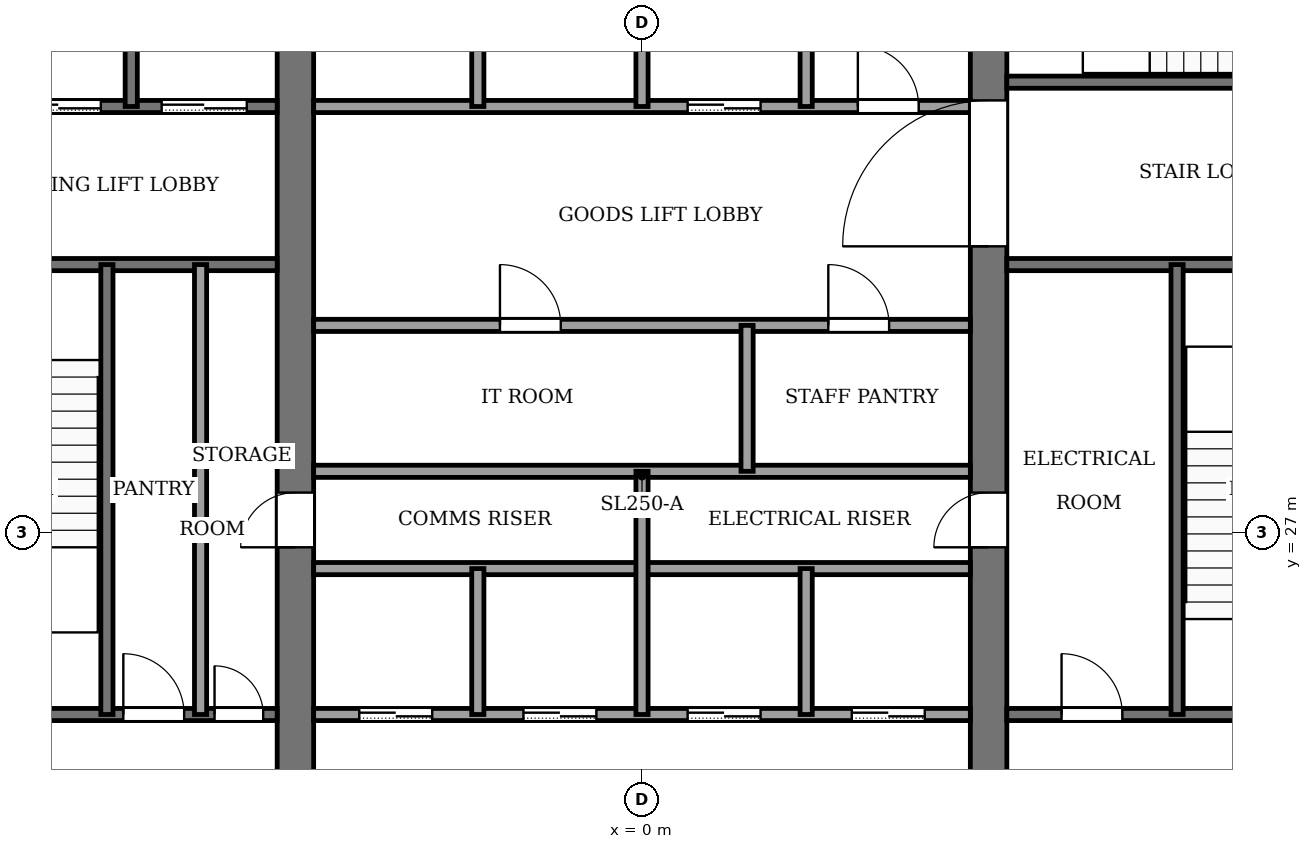
"""IFC4 building model, lengths in metres.
Left out: names, types, materials, properties, quantities, classifications, styles, units other than length and angle.
Written with IfcOpenShell. Run it as: python <this file> out.ifc"""

import sys

from ifc_helpers import new_model, si_unit, direction, frame, frame_2d, origin, place, context, subcontext, project, spatial, rectangle, extrude, element, fill, save


model = new_model("IFC4")
c1 = context("Model", 3, precision=1e-05, world=origin(), true_north=direction((0.0, 1.0)))
c2 = subcontext(c1, "Body", "Model", "MODEL_VIEW")
j1 = project(units=[si_unit("LENGTHUNIT", "METRE"), si_unit("PLANEANGLEUNIT", "RADIAN")], contexts=[c1])
p1 = place(None, origin())
s1 = spatial("IfcSite", under=j1, at=p1, CompositionType="ELEMENT")
p2 = place(p1, origin())
s2 = spatial("IfcBuilding", under=s1, at=p2, CompositionType="ELEMENT")
p3 = place(p2, frame((0.0, 0.0, 262.0)))
s3 = spatial("IfcBuildingStorey", under=s2, at=p3, CompositionType="ELEMENT", Elevation=262.0)
p4 = place(p3, frame((-5.7, 18.4, -0.13), z_axis=(0.0, 0.0, 1.0), x_axis=(0.0, 1.0, 0.0)))
e1 = element("IfcWall", 1, at=p4, inside=s3, PredefinedType="SHEAR", context=c2, shape_type="SweptSolid", body=[
    extrude(rectangle(XDim=19.2, YDim=0.6, at=frame_2d((9.6, 0.0))), origin(), (0.0, 0.0, 1.0), 4.0),
])
p5 = place(p4, frame((8.35, 0.0, 0.13)))
e2 = element("IfcOpeningElement", 2, at=p5, cuts=e1, PredefinedType="OPENING", context=c2, shape_type="SweptSolid", body=[
    extrude(rectangle(XDim=0.9, YDim=2.1, at=frame_2d((0.45, 1.05))), frame((0.0, 0.31, 0.0), z_axis=(0.0, -1.0, 0.0), x_axis=(1.0, 0.0, 0.0)), (0.0, 0.0, 1.0), 0.62),
])
p6 = place(p3, frame((5.7, 18.4, -0.13), z_axis=(0.0, 0.0, 1.0), x_axis=(0.0, 1.0, 0.0)))
e3 = element("IfcWall", 3, at=p6, inside=s3, PredefinedType="SHEAR", context=c2, shape_type="SweptSolid", body=[
    extrude(rectangle(XDim=19.2, YDim=0.6, at=frame_2d((9.6, 0.0))), origin(), (0.0, 0.0, 1.0), 4.0),
])
p7 = place(p6, frame((8.35, 0.0, 0.13)))
e4 = element("IfcOpeningElement", 4, at=p7, cuts=e3, PredefinedType="OPENING", context=c2, shape_type="SweptSolid", body=[
    extrude(rectangle(XDim=0.9, YDim=2.1, at=frame_2d((0.45, 1.05))), frame((0.0, 0.31, 0.0), z_axis=(0.0, -1.0, 0.0), x_axis=(1.0, 0.0, 0.0)), (0.0, 0.0, 1.0), 0.62),
])
p8 = place(p6, frame((13.3, 0.0, 0.13)))
e5 = element("IfcOpeningElement", 5, at=p8, cuts=e3, PredefinedType="OPENING", context=c2, shape_type="SweptSolid", body=[
    extrude(rectangle(XDim=2.4, YDim=2.4, at=frame_2d((1.2, 1.2))), frame((0.0, 0.31, 0.0), z_axis=(0.0, -1.0, 0.0), x_axis=(1.0, 0.0, 0.0)), (0.0, 0.0, 1.0), 0.62),
])
p9 = place(p3, frame((-12.6, 24.0, 0.0), z_axis=(0.0, 0.0, 1.0), x_axis=(1.0, 0.0, 0.0)))
e6 = element("IfcWall", 6, at=p9, inside=s3, PredefinedType="PARTITIONING", context=c2, shape_type="SweptSolid", body=[
    extrude(rectangle(XDim=6.6, YDim=0.2, at=frame_2d((3.3, 0.0))), origin(), (0.0, 0.0, 1.0), 3.87),
])
p10 = place(p9, frame((4.07, 0.0, 0.0)))
e7 = element("IfcOpeningElement", 7, at=p10, cuts=e6, PredefinedType="OPENING", context=c2, shape_type="SweptSolid", body=[
    extrude(rectangle(XDim=1.0, YDim=2.1, at=frame_2d((0.5, 1.05))), frame((0.0, 0.11, 0.0), z_axis=(0.0, -1.0, 0.0), x_axis=(1.0, 0.0, 0.0)), (0.0, 0.0, 1.0), 0.22),
])
p11 = place(p9, frame((5.57, 0.0, 0.0)))
e8 = element("IfcOpeningElement", 8, at=p11, cuts=e6, PredefinedType="OPENING", context=c2, shape_type="SweptSolid", body=[
    extrude(rectangle(XDim=0.8, YDim=2.1, at=frame_2d((0.4, 1.05))), frame((0.0, 0.11, 0.0), z_axis=(0.0, -1.0, 0.0), x_axis=(1.0, 0.0, 0.0)), (0.0, 0.0, 1.0), 0.22),
])
p12 = place(p3, frame((-5.4, 24.0, 0.0), z_axis=(0.0, 0.0, 1.0), x_axis=(1.0, 0.0, 0.0)))
e9 = element("IfcWall", 9, at=p12, inside=s3, PredefinedType="PARTITIONING", context=c2, shape_type="SweptSolid", body=[
    extrude(rectangle(XDim=10.8, YDim=0.2, at=frame_2d((5.4, 0.0))), origin(), (0.0, 0.0, 1.0), 3.87),
])
p13 = place(p12, frame((0.75, 0.0, 0.0)))
e10 = element("IfcOpeningElement", 10, at=p13, cuts=e9, PredefinedType="OPENING", context=c2, shape_type="SweptSolid", body=[
    extrude(rectangle(XDim=1.2, YDim=2.2, at=frame_2d((0.6, 1.1))), frame((0.0, 0.11, 0.0), z_axis=(0.0, -1.0, 0.0), x_axis=(1.0, 0.0, 0.0)), (0.0, 0.0, 1.0), 0.22),
])
p14 = place(p12, frame((3.45, 0.0, 0.0)))
e11 = element("IfcOpeningElement", 11, at=p14, cuts=e9, PredefinedType="OPENING", context=c2, shape_type="SweptSolid", body=[
    extrude(rectangle(XDim=1.2, YDim=2.2, at=frame_2d((0.6, 1.1))), frame((0.0, 0.11, 0.0), z_axis=(0.0, -1.0, 0.0), x_axis=(1.0, 0.0, 0.0)), (0.0, 0.0, 1.0), 0.22),
])
p15 = place(p12, frame((6.15, 0.0, 0.0)))
e12 = element("IfcOpeningElement", 12, at=p15, cuts=e9, PredefinedType="OPENING", context=c2, shape_type="SweptSolid", body=[
    extrude(rectangle(XDim=1.2, YDim=2.2, at=frame_2d((0.6, 1.1))), frame((0.0, 0.11, 0.0), z_axis=(0.0, -1.0, 0.0), x_axis=(1.0, 0.0, 0.0)), (0.0, 0.0, 1.0), 0.22),
])
p16 = place(p12, frame((8.85, 0.0, 0.0)))
e13 = element("IfcOpeningElement", 13, at=p16, cuts=e9, PredefinedType="OPENING", context=c2, shape_type="SweptSolid", body=[
    extrude(rectangle(XDim=1.2, YDim=2.2, at=frame_2d((0.6, 1.1))), frame((0.0, 0.11, 0.0), z_axis=(0.0, -1.0, 0.0), x_axis=(1.0, 0.0, 0.0)), (0.0, 0.0, 1.0), 0.22),
])
p17 = place(p3, frame((6.0, 24.0, 0.0), z_axis=(0.0, 0.0, 1.0), x_axis=(1.0, 0.0, 0.0)))
e14 = element("IfcWall", 14, at=p17, inside=s3, PredefinedType="PARTITIONING", context=c2, shape_type="SweptSolid", body=[
    extrude(rectangle(XDim=6.6, YDim=0.2, at=frame_2d((3.3, 0.0))), origin(), (0.0, 0.0, 1.0), 3.87),
])
p18 = place(p17, frame((0.9, 0.0, 0.0)))
e15 = element("IfcOpeningElement", 15, at=p18, cuts=e14, PredefinedType="OPENING", context=c2, shape_type="SweptSolid", body=[
    extrude(rectangle(XDim=1.0, YDim=2.1, at=frame_2d((0.5, 1.05))), frame((0.0, 0.11, 0.0), z_axis=(0.0, -1.0, 0.0), x_axis=(1.0, 0.0, 0.0)), (0.0, 0.0, 1.0), 0.22),
])
p19 = place(p17, frame((4.4, 0.0, 0.0)))
e16 = element("IfcOpeningElement", 16, at=p19, cuts=e14, PredefinedType="OPENING", context=c2, shape_type="SweptSolid", body=[
    extrude(rectangle(XDim=1.2, YDim=2.2, at=frame_2d((0.6, 1.1))), frame((0.0, 0.11, 0.0), z_axis=(0.0, -1.0, 0.0), x_axis=(1.0, 0.0, 0.0)), (0.0, 0.0, 1.0), 0.22),
])
for number, where, z_axis, x_axis in (
    (17, (-5.4, 26.4, 0.0), (0.0, 0.0, 1.0), (1.0, 0.0, 0.0)),
    (18, (-5.4, 28.0, 0.0), (0.0, 0.0, 1.0), (1.0, 0.0, 0.0)),
):
    element("IfcWall", number, at=place(p3, frame(where, z_axis=z_axis, x_axis=x_axis)), inside=s3, PredefinedType="PARTITIONING", context=c2, shape_type="SweptSolid", body=[
        extrude(rectangle(XDim=10.8, YDim=0.2, at=frame_2d((5.4, 0.0))), origin(), (0.0, 0.0, 1.0), 3.87),
    ])
p20 = place(p3, frame((-5.4, 30.4, 0.0), z_axis=(0.0, 0.0, 1.0), x_axis=(1.0, 0.0, 0.0)))
e19 = element("IfcWall", 19, at=p20, inside=s3, PredefinedType="PARTITIONING", context=c2, shape_type="SweptSolid", body=[
    extrude(rectangle(XDim=10.8, YDim=0.2, at=frame_2d((5.4, 0.0))), origin(), (0.0, 0.0, 1.0), 3.87),
])
p21 = place(p20, frame((3.064, 0.0, 0.0)))
e20 = element("IfcOpeningElement", 20, at=p21, cuts=e19, PredefinedType="OPENING", context=c2, shape_type="SweptSolid", body=[
    extrude(rectangle(XDim=1.0, YDim=2.1, at=frame_2d((0.5, 1.05))), frame((0.0, 0.11, 0.0), z_axis=(0.0, -1.0, 0.0), x_axis=(1.0, 0.0, 0.0)), (0.0, 0.0, 1.0), 0.22),
])
p22 = place(p20, frame((8.464, 0.0, 0.0)))
e21 = element("IfcOpeningElement", 21, at=p22, cuts=e19, PredefinedType="OPENING", context=c2, shape_type="SweptSolid", body=[
    extrude(rectangle(XDim=1.0, YDim=2.1, at=frame_2d((0.5, 1.05))), frame((0.0, 0.11, 0.0), z_axis=(0.0, -1.0, 0.0), x_axis=(1.0, 0.0, 0.0)), (0.0, 0.0, 1.0), 0.22),
])
p23 = place(p3, frame((-12.6, 31.4, 0.0), z_axis=(0.0, 0.0, 1.0), x_axis=(1.0, 0.0, 0.0)))
e22 = element("IfcWall", 22, at=p23, inside=s3, PredefinedType="PARTITIONING", context=c2, shape_type="SweptSolid", body=[
    extrude(rectangle(XDim=6.6, YDim=0.2, at=frame_2d((3.3, 0.0))), origin(), (0.0, 0.0, 1.0), 3.87),
])
p24 = place(p23, frame((1.0, 0.0, 0.0)))
e23 = element("IfcOpeningElement", 23, at=p24, cuts=e22, PredefinedType="OPENING", context=c2, shape_type="SweptSolid", body=[
    extrude(rectangle(XDim=1.2, YDim=2.2, at=frame_2d((0.6, 1.1))), frame((0.0, 0.11, 0.0), z_axis=(0.0, -1.0, 0.0), x_axis=(1.0, 0.0, 0.0)), (0.0, 0.0, 1.0), 0.22),
])
p25 = place(p3, frame((6.0, 31.4, 0.0), z_axis=(0.0, 0.0, 1.0), x_axis=(1.0, 0.0, 0.0)))
e24 = element("IfcWall", 24, at=p25, inside=s3, PredefinedType="PARTITIONING", context=c2, shape_type="SweptSolid", body=[
    extrude(rectangle(XDim=6.6, YDim=0.2, at=frame_2d((3.3, 0.0))), origin(), (0.0, 0.0, 1.0), 3.87),
])
p26 = place(p3, frame((-12.6, 34.0, 0.0), z_axis=(0.0, 0.0, 1.0), x_axis=(1.0, 0.0, 0.0)))
e25 = element("IfcWall", 25, at=p26, inside=s3, PredefinedType="PARTITIONING", context=c2, shape_type="SweptSolid", body=[
    extrude(rectangle(XDim=6.6, YDim=0.2, at=frame_2d((3.3, 0.0))), origin(), (0.0, 0.0, 1.0), 3.87),
])
p27 = place(p26, frame((4.7, 0.0, 0.0)))
e26 = element("IfcOpeningElement", 26, at=p27, cuts=e25, PredefinedType="OPENING", context=c2, shape_type="SweptSolid", body=[
    extrude(rectangle(XDim=1.4, YDim=2.2, at=frame_2d((0.7, 1.1))), frame((0.0, 0.11, 0.0), z_axis=(0.0, -1.0, 0.0), x_axis=(1.0, 0.0, 0.0)), (0.0, 0.0, 1.0), 0.22),
])
p28 = place(p26, frame((2.3, 0.0, 0.0)))
e27 = element("IfcOpeningElement", 27, at=p28, cuts=e25, PredefinedType="OPENING", context=c2, shape_type="SweptSolid", body=[
    extrude(rectangle(XDim=1.4, YDim=2.2, at=frame_2d((0.7, 1.1))), frame((0.0, 0.11, 0.0), z_axis=(0.0, -1.0, 0.0), x_axis=(1.0, 0.0, 0.0)), (0.0, 0.0, 1.0), 0.22),
])
p29 = place(p26, frame((0.45, 0.0, 0.0)))
e28 = element("IfcOpeningElement", 28, at=p29, cuts=e25, PredefinedType="OPENING", context=c2, shape_type="SweptSolid", body=[
    extrude(rectangle(XDim=0.9, YDim=2.1, at=frame_2d((0.45, 1.05))), frame((0.0, 0.11, 0.0), z_axis=(0.0, -1.0, 0.0), x_axis=(1.0, 0.0, 0.0)), (0.0, 0.0, 1.0), 0.22),
])
p30 = place(p3, frame((-5.4, 34.0, 0.0), z_axis=(0.0, 0.0, 1.0), x_axis=(1.0, 0.0, 0.0)))
e29 = element("IfcWall", 29, at=p30, inside=s3, PredefinedType="PARTITIONING", context=c2, shape_type="SweptSolid", body=[
    extrude(rectangle(XDim=10.8, YDim=0.2, at=frame_2d((5.4, 0.0))), origin(), (0.0, 0.0, 1.0), 3.87),
])
p31 = place(p30, frame((6.15, 0.0, 0.0)))
e30 = element("IfcOpeningElement", 30, at=p31, cuts=e29, PredefinedType="OPENING", context=c2, shape_type="SweptSolid", body=[
    extrude(rectangle(XDim=1.2, YDim=2.2, at=frame_2d((0.6, 1.1))), frame((0.0, 0.11, 0.0), z_axis=(0.0, -1.0, 0.0), x_axis=(1.0, 0.0, 0.0)), (0.0, 0.0, 1.0), 0.22),
])
p32 = place(p30, frame((8.95, 0.0, 0.0)))
e31 = element("IfcOpeningElement", 31, at=p32, cuts=e29, PredefinedType="OPENING", context=c2, shape_type="SweptSolid", body=[
    extrude(rectangle(XDim=1.0, YDim=2.1, at=frame_2d((0.5, 1.05))), frame((0.0, 0.11, 0.0), z_axis=(0.0, -1.0, 0.0), x_axis=(1.0, 0.0, 0.0)), (0.0, 0.0, 1.0), 0.22),
])
p33 = place(p3, frame((6.0, 34.4, 0.0), z_axis=(0.0, 0.0, 1.0), x_axis=(1.0, 0.0, 0.0)))
e32 = element("IfcWall", 32, at=p33, inside=s3, PredefinedType="PARTITIONING", context=c2, shape_type="SweptSolid", body=[
    extrude(rectangle(XDim=6.6, YDim=0.2, at=frame_2d((3.3, 0.0))), origin(), (0.0, 0.0, 1.0), 3.87),
])
p34 = place(p33, frame((4.8, 0.0, 0.0)))
e33 = element("IfcOpeningElement", 33, at=p34, cuts=e32, PredefinedType="OPENING", context=c2, shape_type="SweptSolid", body=[
    extrude(rectangle(XDim=1.2, YDim=2.2, at=frame_2d((0.6, 1.1))), frame((0.0, 0.11, 0.0), z_axis=(0.0, -1.0, 0.0), x_axis=(1.0, 0.0, 0.0)), (0.0, 0.0, 1.0), 0.22),
])
p35 = place(p3, frame((-8.8, 24.0, 0.0), z_axis=(0.0, 0.0, 1.0), x_axis=(0.0, 1.0, 0.0)))
e34 = element("IfcWall", 34, at=p35, inside=s3, PredefinedType="PARTITIONING", context=c2, shape_type="SweptSolid", body=[
    extrude(rectangle(XDim=7.4, YDim=0.2, at=frame_2d((3.7, 0.0))), origin(), (0.0, 0.0, 1.0), 3.87),
])
p36 = place(p3, frame((-8.4, 34.0, 0.0), z_axis=(0.0, 0.0, 1.0), x_axis=(0.0, 1.0, 0.0)))
e35 = element("IfcWall", 35, at=p36, inside=s3, PredefinedType="PARTITIONING", context=c2, shape_type="SweptSolid", body=[
    extrude(rectangle(XDim=3.6, YDim=0.2, at=frame_2d((1.8, 0.0))), origin(), (0.0, 0.0, 1.0), 3.87),
])
p37 = place(p3, frame((-7.26, 24.0, 0.0), z_axis=(0.0, 0.0, 1.0), x_axis=(0.0, 1.0, 0.0)))
e36 = element("IfcWall", 36, at=p37, inside=s3, PredefinedType="PARTITIONING", context=c2, shape_type="SweptSolid", body=[
    extrude(rectangle(XDim=7.4, YDim=0.2, at=frame_2d((3.7, 0.0))), origin(), (0.0, 0.0, 1.0), 3.87),
])
p38 = place(p3, frame((-2.7, 24.0, 0.0), z_axis=(0.0, 0.0, 1.0), x_axis=(0.0, 1.0, 0.0)))
e37 = element("IfcWall", 37, at=p38, inside=s3, PredefinedType="PARTITIONING", context=c2, shape_type="SweptSolid", body=[
    extrude(rectangle(XDim=2.4, YDim=0.2, at=frame_2d((1.2, 0.0))), origin(), (0.0, 0.0, 1.0), 3.87),
])
p39 = place(p3, frame((-2.7, 34.0, 0.0), z_axis=(0.0, 0.0, 1.0), x_axis=(0.0, 1.0, 0.0)))
e38 = element("IfcWall", 38, at=p39, inside=s3, PredefinedType="PARTITIONING", context=c2, shape_type="SweptSolid", body=[
    extrude(rectangle(XDim=3.6, YDim=0.2, at=frame_2d((1.8, 0.0))), origin(), (0.0, 0.0, 1.0), 3.87),
])
p40 = place(p3, frame((0.0, 24.0, 0.0), z_axis=(0.0, 0.0, 1.0), x_axis=(0.0, 1.0, 0.0)))
e39 = element("IfcWall", 39, at=p40, inside=s3, PredefinedType="PARTITIONING", context=c2, shape_type="SweptSolid", body=[
    extrude(rectangle(XDim=4.0, YDim=0.2, at=frame_2d((2.0, 0.0))), origin(), (0.0, 0.0, 1.0), 3.87),
])
p41 = place(p3, frame((0.0, 34.0, 0.0), z_axis=(0.0, 0.0, 1.0), x_axis=(0.0, 1.0, 0.0)))
e40 = element("IfcWall", 40, at=p41, inside=s3, PredefinedType="PARTITIONING", context=c2, shape_type="SweptSolid", body=[
    extrude(rectangle(XDim=3.6, YDim=0.2, at=frame_2d((1.8, 0.0))), origin(), (0.0, 0.0, 1.0), 3.87),
])
for number, where, z_axis, x_axis in (
    (41, (1.728, 28.0, 0.0), (0.0, 0.0, 1.0), (0.0, 1.0, 0.0)),
    (42, (2.7, 24.0, 0.0), (0.0, 0.0, 1.0), (0.0, 1.0, 0.0)),
):
    element("IfcWall", number, at=place(p3, frame(where, z_axis=z_axis, x_axis=x_axis)), inside=s3, PredefinedType="PARTITIONING", context=c2, shape_type="SweptSolid", body=[
        extrude(rectangle(XDim=2.4, YDim=0.2, at=frame_2d((1.2, 0.0))), origin(), (0.0, 0.0, 1.0), 3.87),
    ])
p42 = place(p3, frame((2.7, 34.0, 0.0), z_axis=(0.0, 0.0, 1.0), x_axis=(0.0, 1.0, 0.0)))
e43 = element("IfcWall", 43, at=p42, inside=s3, PredefinedType="PARTITIONING", context=c2, shape_type="SweptSolid", body=[
    extrude(rectangle(XDim=3.6, YDim=0.2, at=frame_2d((1.8, 0.0))), origin(), (0.0, 0.0, 1.0), 3.87),
])
p43 = place(p3, frame((8.8, 24.0, 0.0), z_axis=(0.0, 0.0, 1.0), x_axis=(0.0, 1.0, 0.0)))
e44 = element("IfcWall", 44, at=p43, inside=s3, PredefinedType="PARTITIONING", context=c2, shape_type="SweptSolid", body=[
    extrude(rectangle(XDim=7.4, YDim=0.2, at=frame_2d((3.7, 0.0))), origin(), (0.0, 0.0, 1.0), 3.87),
])
p44 = place(p13, origin())
e45 = element("IfcDoor", 45, at=p44, inside=s3, OperationType="SLIDING_TO_LEFT", PredefinedType="DOOR", context=c2, shape_type="SweptSolid", body=[
    extrude(rectangle(XDim=1.2, YDim=2.2, at=frame_2d((0.6, 1.1))), frame((0.0, 0.025, 0.0), z_axis=(0.0, -1.0, 0.0), x_axis=(1.0, 0.0, 0.0)), (0.0, 0.0, 1.0), 0.05),
])
fill(e10, e45)
p45 = place(p14, origin())
e46 = element("IfcDoor", 46, at=p45, inside=s3, OperationType="SLIDING_TO_LEFT", PredefinedType="DOOR", context=c2, shape_type="SweptSolid", body=[
    extrude(rectangle(XDim=1.2, YDim=2.2, at=frame_2d((0.6, 1.1))), frame((0.0, 0.025, 0.0), z_axis=(0.0, -1.0, 0.0), x_axis=(1.0, 0.0, 0.0)), (0.0, 0.0, 1.0), 0.05),
])
fill(e11, e46)
p46 = place(p15, origin())
e47 = element("IfcDoor", 47, at=p46, inside=s3, OperationType="SLIDING_TO_LEFT", PredefinedType="DOOR", context=c2, shape_type="SweptSolid", body=[
    extrude(rectangle(XDim=1.2, YDim=2.2, at=frame_2d((0.6, 1.1))), frame((0.0, 0.025, 0.0), z_axis=(0.0, -1.0, 0.0), x_axis=(1.0, 0.0, 0.0)), (0.0, 0.0, 1.0), 0.05),
])
fill(e12, e47)
p47 = place(p16, origin())
e48 = element("IfcDoor", 48, at=p47, inside=s3, OperationType="SLIDING_TO_LEFT", PredefinedType="DOOR", context=c2, shape_type="SweptSolid", body=[
    extrude(rectangle(XDim=1.2, YDim=2.2, at=frame_2d((0.6, 1.1))), frame((0.0, 0.025, 0.0), z_axis=(0.0, -1.0, 0.0), x_axis=(1.0, 0.0, 0.0)), (0.0, 0.0, 1.0), 0.05),
])
fill(e13, e48)
p48 = place(p31, origin())
e49 = element("IfcDoor", 49, at=p48, inside=s3, OperationType="SLIDING_TO_LEFT", PredefinedType="DOOR", context=c2, shape_type="SweptSolid", body=[
    extrude(rectangle(XDim=1.2, YDim=2.2, at=frame_2d((0.6, 1.1))), frame((0.0, 0.025, 0.0), z_axis=(0.0, -1.0, 0.0), x_axis=(1.0, 0.0, 0.0)), (0.0, 0.0, 1.0), 0.05),
])
fill(e30, e49)
p49 = place(p27, origin())
e50 = element("IfcDoor", 50, at=p49, inside=s3, OperationType="SLIDING_TO_LEFT", PredefinedType="DOOR", context=c2, shape_type="SweptSolid", body=[
    extrude(rectangle(XDim=1.4, YDim=2.2, at=frame_2d((0.7, 1.1))), frame((0.0, 0.025, 0.0), z_axis=(0.0, -1.0, 0.0), x_axis=(1.0, 0.0, 0.0)), (0.0, 0.0, 1.0), 0.05),
])
fill(e26, e50)
p50 = place(p28, origin())
e51 = element("IfcDoor", 51, at=p50, inside=s3, OperationType="SLIDING_TO_LEFT", PredefinedType="DOOR", context=c2, shape_type="SweptSolid", body=[
    extrude(rectangle(XDim=1.4, YDim=2.2, at=frame_2d((0.7, 1.1))), frame((0.0, 0.025, 0.0), z_axis=(0.0, -1.0, 0.0), x_axis=(1.0, 0.0, 0.0)), (0.0, 0.0, 1.0), 0.05),
])
fill(e27, e51)
p51 = place(p21, origin())
e52 = element("IfcDoor", 52, at=p51, inside=s3, OperationType="SINGLE_SWING_RIGHT", PredefinedType="DOOR", context=c2, shape_type="SweptSolid", body=[
    extrude(rectangle(XDim=1.0, YDim=2.1, at=frame_2d((0.5, 1.05))), frame((0.0, 0.025, 0.0), z_axis=(0.0, -1.0, 0.0), x_axis=(1.0, 0.0, 0.0)), (0.0, 0.0, 1.0), 0.05),
])
fill(e20, e52)
p52 = place(p22, origin())
e53 = element("IfcDoor", 53, at=p52, inside=s3, OperationType="SINGLE_SWING_LEFT", PredefinedType="DOOR", context=c2, shape_type="SweptSolid", body=[
    extrude(rectangle(XDim=1.0, YDim=2.1, at=frame_2d((0.5, 1.05))), frame((0.0, 0.025, 0.0), z_axis=(0.0, -1.0, 0.0), x_axis=(1.0, 0.0, 0.0)), (0.0, 0.0, 1.0), 0.05),
])
fill(e21, e53)
p53 = place(p10, origin())
e54 = element("IfcDoor", 54, at=p53, inside=s3, OperationType="SINGLE_SWING_RIGHT", PredefinedType="DOOR", context=c2, shape_type="SweptSolid", body=[
    extrude(rectangle(XDim=1.0, YDim=2.1, at=frame_2d((0.5, 1.05))), frame((0.0, 0.025, 0.0), z_axis=(0.0, -1.0, 0.0), x_axis=(1.0, 0.0, 0.0)), (0.0, 0.0, 1.0), 0.05),
])
fill(e7, e54)
p54 = place(p11, origin())
e55 = element("IfcDoor", 55, at=p54, inside=s3, OperationType="SINGLE_SWING_LEFT", PredefinedType="DOOR", context=c2, shape_type="SweptSolid", body=[
    extrude(rectangle(XDim=0.8, YDim=2.1, at=frame_2d((0.4, 1.05))), frame((0.0, 0.025, 0.0), z_axis=(0.0, -1.0, 0.0), x_axis=(1.0, 0.0, 0.0)), (0.0, 0.0, 1.0), 0.05),
])
fill(e8, e55)
p55 = place(p18, origin())
e56 = element("IfcDoor", 56, at=p55, inside=s3, OperationType="SINGLE_SWING_RIGHT", PredefinedType="DOOR", context=c2, shape_type="SweptSolid", body=[
    extrude(rectangle(XDim=1.0, YDim=2.1, at=frame_2d((0.5, 1.05))), frame((0.0, 0.025, 0.0), z_axis=(0.0, -1.0, 0.0), x_axis=(1.0, 0.0, 0.0)), (0.0, 0.0, 1.0), 0.05),
])
fill(e15, e56)
p56 = place(p32, origin())
e57 = element("IfcDoor", 57, at=p56, inside=s3, OperationType="SINGLE_SWING_LEFT", PredefinedType="DOOR", context=c2, shape_type="SweptSolid", body=[
    extrude(rectangle(XDim=1.0, YDim=2.1, at=frame_2d((0.5, 1.05))), frame((0.0, 0.025, 0.0), z_axis=(0.0, -1.0, 0.0), x_axis=(1.0, 0.0, 0.0)), (0.0, 0.0, 1.0), 0.05),
])
fill(e31, e57)
p57 = place(p5, origin())
e58 = element("IfcDoor", 58, at=p57, inside=s3, OperationType="SINGLE_SWING_LEFT", PredefinedType="DOOR", context=c2, shape_type="SweptSolid", body=[
    extrude(rectangle(XDim=0.9, YDim=2.1, at=frame_2d((0.45, 1.05))), frame((0.0, 0.025, 0.0), z_axis=(0.0, -1.0, 0.0), x_axis=(1.0, 0.0, 0.0)), (0.0, 0.0, 1.0), 0.05),
])
fill(e2, e58)
p58 = place(p7, origin())
e59 = element("IfcDoor", 59, at=p58, inside=s3, OperationType="SINGLE_SWING_RIGHT", PredefinedType="DOOR", context=c2, shape_type="SweptSolid", body=[
    extrude(rectangle(XDim=0.9, YDim=2.1, at=frame_2d((0.45, 1.05))), frame((0.0, 0.025, 0.0), z_axis=(0.0, -1.0, 0.0), x_axis=(1.0, 0.0, 0.0)), (0.0, 0.0, 1.0), 0.05),
])
fill(e4, e59)
p59 = place(p8, origin())
e60 = element("IfcDoor", 60, at=p59, inside=s3, OperationType="DOUBLE_DOOR_SINGLE_SWING", PredefinedType="DOOR", context=c2, shape_type="SweptSolid", body=[
    extrude(rectangle(XDim=2.4, YDim=2.4, at=frame_2d((1.2, 1.2))), frame((0.0, 0.025, 0.0), z_axis=(0.0, -1.0, 0.0), x_axis=(1.0, 0.0, 0.0)), (0.0, 0.0, 1.0), 0.05),
])
fill(e5, e60)
save(model, sys.argv[1])
